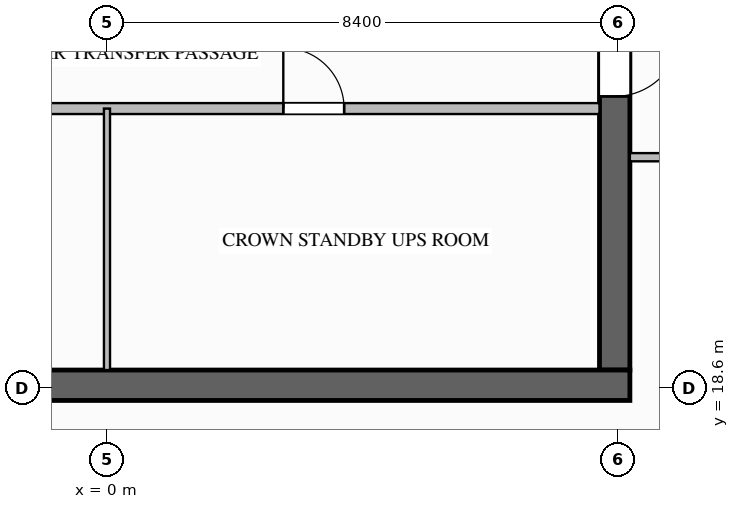
"""IFC4 building model, lengths in metres.
Left out: names, types, materials, properties, quantities, classifications, styles, units other than length and angle.
Written with IfcOpenShell. Run it as: python <this file> out.ifc"""

import sys

from ifc_helpers import new_model, si_unit, direction, frame, frame_2d, origin, place, context, subcontext, project, spatial, rectangle, extrude, element, fill, save


model = new_model("IFC4")
c1 = context("Model", 3, precision=1e-05, world=origin(), true_north=direction((0.0, 1.0)))
c2 = subcontext(c1, "Body", "Model", "MODEL_VIEW")
j1 = project(units=[si_unit("LENGTHUNIT", "METRE"), si_unit("PLANEANGLEUNIT", "RADIAN")], contexts=[c1])
p1 = place(None, origin())
s1 = spatial("IfcSite", under=j1, at=p1, CompositionType="ELEMENT")
p2 = place(p1, origin())
s2 = spatial("IfcBuilding", under=s1, at=p2, CompositionType="ELEMENT")
p3 = place(p2, frame((0.0, 0.0, 303.0)))
s3 = spatial("IfcBuildingStorey", under=s2, at=p3, CompositionType="ELEMENT", Elevation=303.0)
p4 = place(p3, frame((8.35, 35.1, 0.0), z_axis=(0.0, 0.0, 1.0), x_axis=(0.0, -1.0, 0.0)))
e1 = element("IfcWall", 1, at=p4, inside=s3, PredefinedType="SHEAR", context=c2, shape_type="SweptSolid", body=[
    extrude(rectangle(XDim=16.2, YDim=0.5, at=frame_2d((8.1, 0.0))), origin(), (0.0, 0.0, 1.0), 4.2),
])
p5 = place(p4, frame((3.08, 0.0, 0.0)))
e2 = element("IfcOpeningElement", 2, at=p5, cuts=e1, PredefinedType="OPENING", context=c2, shape_type="SweptSolid", body=[
    extrude(rectangle(XDim=1.12, YDim=2.1, at=frame_2d((0.56, 1.05))), frame((0.0, 0.26, 0.0), z_axis=(0.0, -1.0, 0.0), x_axis=(1.0, 0.0, 0.0)), (0.0, 0.0, 1.0), 0.52),
])
p6 = place(p4, frame((10.62, 0.0, 0.0)))
e3 = element("IfcOpeningElement", 3, at=p6, cuts=e1, PredefinedType="OPENING", context=c2, shape_type="SweptSolid", body=[
    extrude(rectangle(XDim=1.08, YDim=2.04, at=frame_2d((0.54, 1.02))), frame((0.0, 0.26, 0.0), z_axis=(0.0, -1.0, 0.0), x_axis=(1.0, 0.0, 0.0)), (0.0, 0.0, 1.0), 0.52),
])
p7 = place(p3, frame((8.6, 18.65, 0.0), z_axis=(0.0, 0.0, 1.0), x_axis=(-1.0, 0.0, 0.0)))
e4 = element("IfcWall", 4, at=p7, inside=s3, PredefinedType="SHEAR", context=c2, shape_type="SweptSolid", body=[
    extrude(rectangle(XDim=17.2, YDim=0.5, at=frame_2d((8.6, 0.0))), origin(), (0.0, 0.0, 1.0), 4.2),
])
p8 = place(p3, frame((-8.1, 23.2, 0.0), z_axis=(0.0, 0.0, 1.0), x_axis=(1.0, 0.0, 0.0)))
e5 = element("IfcWall", 5, at=p8, inside=s3, PredefinedType="SOLIDWALL", context=c2, shape_type="SweptSolid", body=[
    extrude(rectangle(XDim=16.2, YDim=0.18, at=frame_2d((8.1, 0.0))), origin(), (0.0, 0.0, 1.0), 3.85),
])
p9 = place(p8, frame((2.5, 0.0, 0.0)))
e6 = element("IfcOpeningElement", 6, at=p9, cuts=e5, PredefinedType="OPENING", context=c2, shape_type="SweptSolid", body=[
    extrude(rectangle(XDim=1.0, YDim=2.1, at=frame_2d((0.5, 1.05))), frame((0.0, 0.1, 0.0), z_axis=(0.0, -1.0, 0.0), x_axis=(1.0, 0.0, 0.0)), (0.0, 0.0, 1.0), 0.2),
])
p10 = place(p8, frame((11.0, 0.0, 0.0)))
e7 = element("IfcOpeningElement", 7, at=p10, cuts=e5, PredefinedType="OPENING", context=c2, shape_type="SweptSolid", body=[
    extrude(rectangle(XDim=1.0, YDim=2.1, at=frame_2d((0.5, 1.05))), frame((0.0, 0.1, 0.0), z_axis=(0.0, -1.0, 0.0), x_axis=(1.0, 0.0, 0.0)), (0.0, 0.0, 1.0), 0.2),
])
p11 = place(p3, frame((0.0, 18.9, 0.0), z_axis=(0.0, 0.0, 1.0), x_axis=(0.0, 1.0, 0.0)))
e8 = element("IfcWall", 8, at=p11, inside=s3, PredefinedType="PARTITIONING", context=c2, shape_type="SweptSolid", body=[
    extrude(rectangle(XDim=4.3, YDim=0.1, at=frame_2d((2.15, 0.0))), origin(), (0.0, 0.0, 1.0), 3.85),
])
p12 = place(p3, frame((8.6, 22.4, 0.0), z_axis=(0.0, 0.0, 1.0), x_axis=(1.0, 0.0, 0.0)))
e9 = element("IfcWall", 9, at=p12, inside=s3, PredefinedType="PARTITIONING", context=c2, shape_type="SweptSolid", body=[
    extrude(rectangle(XDim=2.4, YDim=0.135, at=frame_2d((1.2, 0.0))), origin(), (0.0, 0.0, 1.0), 3.85),
])
p13 = place(p6, origin())
e10 = element("IfcDoor", 10, at=p13, inside=s3, OperationType="SINGLE_SWING_LEFT", PredefinedType="DOOR", context=c2, shape_type="SweptSolid", body=[
    extrude(rectangle(XDim=1.08, YDim=2.04, at=frame_2d((0.54, 1.02))), frame((0.0, 0.025, 0.0), z_axis=(0.0, -1.0, 0.0), x_axis=(1.0, 0.0, 0.0)), (0.0, 0.0, 1.0), 0.05),
])
fill(e3, e10)
p14 = place(p10, origin())
e11 = element("IfcDoor", 11, at=p14, inside=s3, OperationType="SINGLE_SWING_LEFT", PredefinedType="DOOR", context=c2, shape_type="SweptSolid", body=[
    extrude(rectangle(XDim=1.0, YDim=2.1, at=frame_2d((0.5, 1.05))), frame((0.0, 0.025, 0.0), z_axis=(0.0, -1.0, 0.0), x_axis=(1.0, 0.0, 0.0)), (0.0, 0.0, 1.0), 0.05),
])
fill(e7, e11)
save(model, sys.argv[1])
